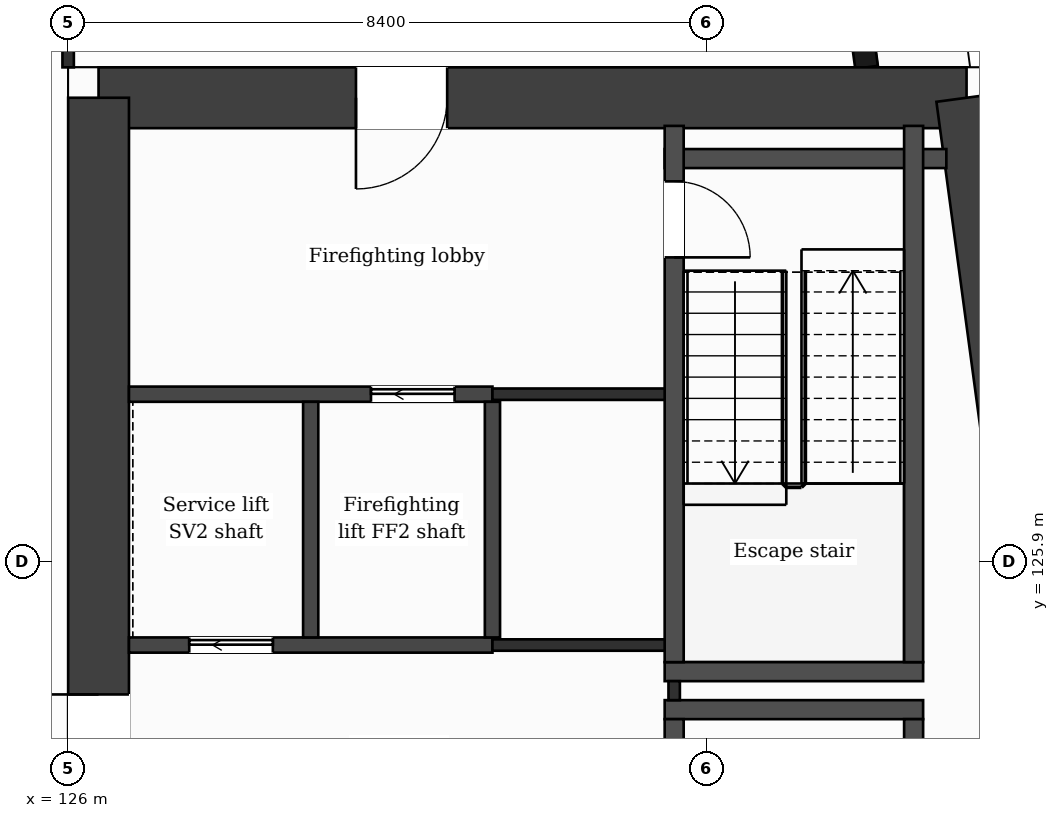
"""IFC4 building model, lengths in metres.
Left out: names, types, materials, properties, quantities, classifications, styles, units other than length and angle.
Written with IfcOpenShell. Run it as: python <this file> out.ifc"""

import sys

from ifc_helpers import new_model, si_unit, direction, frame, frame_2d, origin, place, context, subcontext, project, spatial, rectangle, extrude, element, fill, save


model = new_model("IFC4")
c1 = context("Model", 3, precision=1e-05, world=origin(), true_north=direction((0.0, 1.0)))
c2 = subcontext(c1, "Body", "Model", "MODEL_VIEW")
j1 = project(units=[si_unit("LENGTHUNIT", "METRE"), si_unit("PLANEANGLEUNIT", "RADIAN")], contexts=[c1])
p1 = place(None, origin())
s1 = spatial("IfcSite", under=j1, at=p1, CompositionType="ELEMENT")
p2 = place(p1, origin())
s2 = spatial("IfcBuilding", under=s1, at=p2, CompositionType="ELEMENT")
p3 = place(p2, frame((0.0, 0.0, 231.8)))
s3 = spatial("IfcBuildingStorey", under=s2, at=p3, CompositionType="ELEMENT", Elevation=231.8)
p4 = place(p3, frame((126.4, 132.0, 0.0), z_axis=(0.0, 0.0, 1.0), x_axis=(1.0, 0.0, 0.0)))
e1 = element("IfcWall", 1, at=p4, inside=s3, PredefinedType="SHEAR", context=c2, shape_type="SweptSolid", body=[
    extrude(rectangle(XDim=11.42, YDim=0.8, at=frame_2d((5.71, 0.0))), origin(), (0.0, 0.0, 1.0), 3.7),
])
p5 = place(p4, frame((3.386, 0.0, 0.0)))
e2 = element("IfcOpeningElement", 2, at=p5, cuts=e1, PredefinedType="OPENING", context=c2, shape_type="SweptSolid", body=[
    extrude(rectangle(XDim=1.2, YDim=2.1, at=frame_2d((0.6, 1.05))), frame((0.0, 0.41, 0.0), z_axis=(0.0, -1.0, 0.0), x_axis=(1.0, 0.0, 0.0)), (0.0, 0.0, 1.0), 0.82),
])
p6 = place(p3, frame((137.82, 132.0, 0.0), z_axis=(0.0, 0.0, 1.0), x_axis=(0.133408347329, -0.991061154956, 0.0)))
e3 = element("IfcWall", 3, at=p6, inside=s3, PredefinedType="SHEAR", context=c2, shape_type="SweptSolid", body=[
    extrude(rectangle(XDim=21.391, YDim=0.8, at=frame_2d((10.696, 0.0))), origin(), (0.0, 0.0, 1.0), 3.7),
])
p7 = place(p3, frame((126.4, 110.8, 0.0), z_axis=(0.0, 0.0, 1.0), x_axis=(0.0, 1.0, 0.0)))
e4 = element("IfcWall", 4, at=p7, inside=s3, PredefinedType="SHEAR", context=c2, shape_type="SweptSolid", body=[
    extrude(rectangle(XDim=21.2, YDim=0.8, at=frame_2d((10.6, 0.0))), origin(), (0.0, 0.0, 1.0), 3.7),
])
p8 = place(p7, frame((11.95, 0.0, 0.0)))
e5 = element("IfcOpeningElement", 5, at=p8, cuts=e4, PredefinedType="OPENING", context=c2, shape_type="SweptSolid", body=[
    extrude(rectangle(XDim=1.4, YDim=2.1, at=frame_2d((0.7, 1.05))), frame((0.0, 0.41, 0.0), z_axis=(0.0, -1.0, 0.0), x_axis=(1.0, 0.0, 0.0)), (0.0, 0.0, 1.0), 0.82),
])
p9 = place(p3, frame((136.504, 132.4, 0.0), z_axis=(0.0, 0.0, 1.0), x_axis=(-0.133399697462, 0.99106231929, 0.0)))
e6 = element("IfcWall", 6, at=p9, inside=s3, PredefinedType="SOLIDWALL", context=c2, shape_type="SweptSolid", body=[
    extrude(rectangle(XDim=6.74, YDim=0.3, at=frame_2d((3.37, 0.0))), origin(), (0.0, 0.0, 1.0), 3.38),
])
p10 = place(p9, frame((1.115, 0.0, 0.0)))
e7 = element("IfcOpeningElement", 7, at=p10, cuts=e6, PredefinedType="OPENING", context=c2, shape_type="SweptSolid", body=[
    extrude(rectangle(XDim=1.2, YDim=2.4, at=frame_2d((0.6, 1.2))), frame((0.0, 0.16, 0.0), z_axis=(0.0, -1.0, 0.0), x_axis=(1.0, 0.0, 0.0)), (0.0, 0.0, 1.0), 0.32),
])
p11 = place(p9, frame((3.835, 0.0, 0.9)))
e8 = element("IfcOpeningElement", 8, at=p11, cuts=e6, PredefinedType="OPENING", context=c2, shape_type="SweptSolid", body=[
    extrude(rectangle(XDim=2.4, YDim=2.1, at=frame_2d((1.2, 1.05))), frame((0.0, 0.16, 0.0), z_axis=(0.0, -1.0, 0.0), x_axis=(1.0, 0.0, 0.0)), (0.0, 0.0, 1.0), 0.32),
])
for number, where, z_axis, x_axis in (
    (9, (133.848, 123.95, 0.0), (0.0, 0.0, 1.0), (1.0, 0.0, 0.0)),
    (10, (133.848, 124.45, 0.0), (0.0, 0.0, 1.0), (1.0, 0.0, 0.0)),
):
    element("IfcWall", number, at=place(p3, frame(where, z_axis=z_axis, x_axis=x_axis)), inside=s3, PredefinedType="PARTITIONING", context=c2, shape_type="SweptSolid", body=[
        extrude(rectangle(XDim=3.4, YDim=0.25, at=frame_2d((1.7, 0.0))), origin(), (0.0, 0.0, 1.0), 3.38),
    ])
p12 = place(p3, frame((126.8, 124.8, 0.0), z_axis=(0.0, 0.0, 1.0), x_axis=(1.0, 0.0, 0.0)))
e11 = element("IfcWall", 11, at=p12, inside=s3, PredefinedType="PARTITIONING", context=c2, shape_type="SweptSolid", body=[
    extrude(rectangle(XDim=4.782, YDim=0.2, at=frame_2d((2.391, 0.0))), origin(), (0.0, 0.0, 1.0), 3.38),
])
p13 = place(p12, frame((0.793, 0.0, 0.0)))
e12 = element("IfcOpeningElement", 12, at=p13, cuts=e11, PredefinedType="OPENING", context=c2, shape_type="SweptSolid", body=[
    extrude(rectangle(XDim=1.1, YDim=2.1, at=frame_2d((0.55, 1.05))), frame((0.0, 0.11, 0.0), z_axis=(0.0, -1.0, 0.0), x_axis=(1.0, 0.0, 0.0)), (0.0, 0.0, 1.0), 0.22),
])
p14 = place(p3, frame((131.582, 124.8, 0.0), z_axis=(0.0, 0.0, 1.0), x_axis=(1.0, 0.0, 0.0)))
e13 = element("IfcWall", 13, at=p14, inside=s3, PredefinedType="PARTITIONING", context=c2, shape_type="SweptSolid", body=[
    extrude(rectangle(XDim=2.516, YDim=0.15, at=frame_2d((1.258, 0.0))), origin(), (0.0, 0.0, 1.0), 3.38),
])
p15 = place(p3, frame((126.8, 128.1, 0.0), z_axis=(0.0, 0.0, 1.0), x_axis=(1.0, 0.0, 0.0)))
e14 = element("IfcWall", 14, at=p15, inside=s3, PredefinedType="PARTITIONING", context=c2, shape_type="SweptSolid", body=[
    extrude(rectangle(XDim=4.782, YDim=0.2, at=frame_2d((2.391, 0.0))), origin(), (0.0, 0.0, 1.0), 3.38),
])
p16 = place(p15, frame((3.184, 0.0, 0.0)))
e15 = element("IfcOpeningElement", 15, at=p16, cuts=e14, PredefinedType="OPENING", context=c2, shape_type="SweptSolid", body=[
    extrude(rectangle(XDim=1.1, YDim=2.1, at=frame_2d((0.55, 1.05))), frame((0.0, 0.11, 0.0), z_axis=(0.0, -1.0, 0.0), x_axis=(1.0, 0.0, 0.0)), (0.0, 0.0, 1.0), 0.22),
])
p17 = place(p3, frame((131.582, 128.1, 0.0), z_axis=(0.0, 0.0, 1.0), x_axis=(1.0, 0.0, 0.0)))
e16 = element("IfcWall", 16, at=p17, inside=s3, PredefinedType="PARTITIONING", context=c2, shape_type="SweptSolid", body=[
    extrude(rectangle(XDim=2.391, YDim=0.15, at=frame_2d((1.195, 0.0))), origin(), (0.0, 0.0, 1.0), 3.38),
])
p18 = place(p3, frame((133.848, 131.2, 0.0), z_axis=(0.0, 0.0, 1.0), x_axis=(1.0, 0.0, 0.0)))
e17 = element("IfcWall", 17, at=p18, inside=s3, PredefinedType="PARTITIONING", context=c2, shape_type="SweptSolid", body=[
    extrude(rectangle(XDim=3.706, YDim=0.25, at=frame_2d((1.853, 0.0))), origin(), (0.0, 0.0, 1.0), 3.38),
])
p19 = place(p3, frame((126.0, 132.4, 0.0), z_axis=(0.0, 0.0, 1.0), x_axis=(0.0, 1.0, 0.0)))
e18 = element("IfcWall", 18, at=p19, inside=s3, PredefinedType="PARTITIONING", context=c2, shape_type="SweptSolid", body=[
    extrude(rectangle(XDim=1.325, YDim=0.15, at=frame_2d((0.663, 0.0))), origin(), (0.0, 0.0, 1.0), 3.38),
])
for number, where, z_axis, x_axis in (
    (19, (129.191, 124.9, 0.0), (0.0, 0.0, 1.0), (0.0, 1.0, 0.0)),
    (20, (131.582, 124.9, 0.0), (0.0, 0.0, 1.0), (0.0, 1.0, 0.0)),
):
    element("IfcWall", number, at=place(p3, frame(where, z_axis=z_axis, x_axis=x_axis)), inside=s3, PredefinedType="PARTITIONING", context=c2, shape_type="SweptSolid", body=[
        extrude(rectangle(XDim=3.1, YDim=0.2, at=frame_2d((1.55, 0.0))), origin(), (0.0, 0.0, 1.0), 3.38),
    ])
p20 = place(p3, frame((133.973, 124.075, 0.0), z_axis=(0.0, 0.0, 1.0), x_axis=(0.0, 1.0, 0.0)))
e21 = element("IfcWall", 21, at=p20, inside=s3, PredefinedType="PARTITIONING", context=c2, shape_type="SweptSolid", body=[
    extrude(rectangle(XDim=0.25, YDim=0.15, at=frame_2d((0.125, 0.0))), origin(), (0.0, 0.0, 1.0), 3.38),
])
p21 = place(p3, frame((133.973, 116.77, 0.0), z_axis=(0.0, 0.0, 1.0), x_axis=(0.0, 1.0, 0.0)))
e22 = element("IfcWall", 22, at=p21, inside=s3, PredefinedType="PARTITIONING", context=c2, shape_type="SweptSolid", body=[
    extrude(rectangle(XDim=7.055, YDim=0.25, at=frame_2d((3.527, 0.0))), origin(), (0.0, 0.0, 1.0), 3.38),
])
p22 = place(p21, frame((5.755, 0.0, 0.0)))
e23 = element("IfcOpeningElement", 23, at=p22, cuts=e22, PredefinedType="OPENING", context=c2, shape_type="SweptSolid", body=[
    extrude(rectangle(XDim=0.95, YDim=2.1, at=frame_2d((0.475, 1.05))), frame((0.0, 0.135, 0.0), z_axis=(0.0, -1.0, 0.0), x_axis=(1.0, 0.0, 0.0)), (0.0, 0.0, 1.0), 0.27),
])
p23 = place(p3, frame((133.973, 124.575, 0.0), z_axis=(0.0, 0.0, 1.0), x_axis=(0.0, 1.0, 0.0)))
e24 = element("IfcWall", 24, at=p23, inside=s3, PredefinedType="PARTITIONING", context=c2, shape_type="SweptSolid", body=[
    extrude(rectangle(XDim=7.055, YDim=0.25, at=frame_2d((3.527, 0.0))), origin(), (0.0, 0.0, 1.0), 3.38),
])
p24 = place(p23, frame((5.325, 0.0, 0.0)))
e25 = element("IfcOpeningElement", 25, at=p24, cuts=e24, PredefinedType="OPENING", context=c2, shape_type="SweptSolid", body=[
    extrude(rectangle(XDim=1.0, YDim=2.1, at=frame_2d((0.5, 1.05))), frame((0.0, 0.135, 0.0), z_axis=(0.0, -1.0, 0.0), x_axis=(1.0, 0.0, 0.0)), (0.0, 0.0, 1.0), 0.27),
])
for number, where, z_axis, x_axis in (
    (26, (137.123, 116.77, 0.0), (0.0, 0.0, 1.0), (0.0, 1.0, 0.0)),
    (27, (137.123, 124.575, 0.0), (0.0, 0.0, 1.0), (0.0, 1.0, 0.0)),
):
    element("IfcWall", number, at=place(p3, frame(where, z_axis=z_axis, x_axis=x_axis)), inside=s3, PredefinedType="PARTITIONING", context=c2, shape_type="SweptSolid", body=[
        extrude(rectangle(XDim=7.055, YDim=0.25, at=frame_2d((3.527, 0.0))), origin(), (0.0, 0.0, 1.0), 3.38),
    ])
p25 = place(p16, origin())
e28 = element("IfcDoor", 28, at=p25, inside=s3, OperationType="SLIDING_TO_LEFT", PredefinedType="DOOR", context=c2, shape_type="SweptSolid", body=[
    extrude(rectangle(XDim=1.1, YDim=2.1, at=frame_2d((0.55, 1.05))), frame((0.0, 0.025, 0.0), z_axis=(0.0, -1.0, 0.0), x_axis=(1.0, 0.0, 0.0)), (0.0, 0.0, 1.0), 0.05),
])
fill(e15, e28)
p26 = place(p13, origin())
e29 = element("IfcDoor", 29, at=p26, inside=s3, OperationType="SLIDING_TO_LEFT", PredefinedType="DOOR", context=c2, shape_type="SweptSolid", body=[
    extrude(rectangle(XDim=1.1, YDim=2.1, at=frame_2d((0.55, 1.05))), frame((0.0, 0.025, 0.0), z_axis=(0.0, -1.0, 0.0), x_axis=(1.0, 0.0, 0.0)), (0.0, 0.0, 1.0), 0.05),
])
fill(e12, e29)
p27 = place(p24, origin())
e30 = element("IfcDoor", 30, at=p27, inside=s3, OperationType="SINGLE_SWING_LEFT", PredefinedType="DOOR", context=c2, shape_type="SweptSolid", body=[
    extrude(rectangle(XDim=1.0, YDim=2.1, at=frame_2d((0.5, 1.05))), frame((0.0, 0.025, 0.0), z_axis=(0.0, -1.0, 0.0), x_axis=(1.0, 0.0, 0.0)), (0.0, 0.0, 1.0), 0.05),
])
fill(e25, e30)
p28 = place(p5, origin())
e31 = element("IfcDoor", 31, at=p28, inside=s3, OperationType="SINGLE_SWING_LEFT", PredefinedType="DOOR", context=c2, shape_type="SweptSolid", body=[
    extrude(rectangle(XDim=1.2, YDim=2.1, at=frame_2d((0.6, 1.05))), frame((0.0, 0.025, 0.0), z_axis=(0.0, -1.0, 0.0), x_axis=(1.0, 0.0, 0.0)), (0.0, 0.0, 1.0), 0.05),
])
fill(e2, e31)
p29 = place(p8, origin())
e32 = element("IfcDoor", 32, at=p29, inside=s3, OperationType="SINGLE_SWING_RIGHT", PredefinedType="DOOR", context=c2, shape_type="SweptSolid", body=[
    extrude(rectangle(XDim=1.4, YDim=2.1, at=frame_2d((0.7, 1.05))), frame((0.0, 0.025, 0.0), z_axis=(0.0, -1.0, 0.0), x_axis=(1.0, 0.0, 0.0)), (0.0, 0.0, 1.0), 0.05),
])
fill(e5, e32)
save(model, sys.argv[1])
